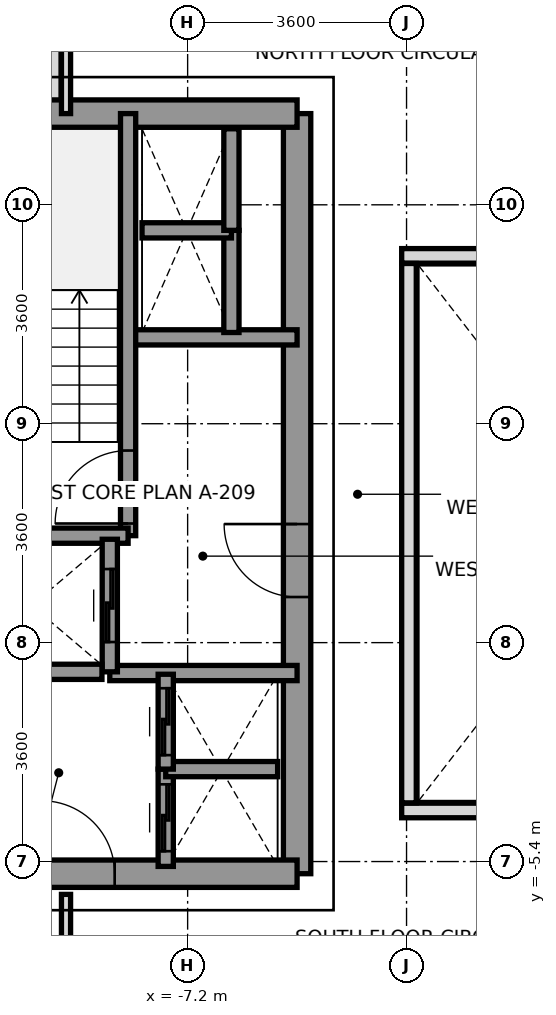
"""IFC4 building model, lengths in metres.
Left out: names, types, materials, properties, quantities, classifications, styles, units other than length and angle.
Written with IfcOpenShell. Run it as: python <this file> out.ifc"""

import sys

from ifc_helpers import new_model, si_unit, direction, frame, frame_2d, origin, place, context, subcontext, project, spatial, rectangle, extrude, source, transform, mapped, element, fill, save


model = new_model("IFC4")
c1 = context("Model", 3, precision=1e-05, world=origin(), true_north=direction((0.0, 1.0)))
c2 = subcontext(c1, "Body", "Model", "MODEL_VIEW")
j1 = project(units=[si_unit("LENGTHUNIT", "METRE"), si_unit("PLANEANGLEUNIT", "RADIAN")], contexts=[c1])
p1 = place(None, origin())
s1 = spatial("IfcSite", under=j1, at=p1, CompositionType="ELEMENT")
p2 = place(p1, origin())
s2 = spatial("IfcBuilding", under=s1, at=p2, CompositionType="ELEMENT")
p3 = place(p2, frame((0.0, 0.0, 134.6)))
s3 = spatial("IfcBuildingStorey", under=s2, at=p3, CompositionType="ELEMENT", Elevation=134.6)
p4 = place(p3, frame((-9.4, 6.953, 0.0), z_axis=(0.0, 0.0, 1.0), x_axis=(0.0, 1.0, 0.0)))
e1 = element("IfcWall", 1, at=p4, inside=s3, PredefinedType="PARAPET", context=c2, shape_type="SweptSolid", body=[
    extrude(rectangle(XDim=1.519, YDim=0.24, at=frame_2d((0.76, 0.0))), origin(), (0.0, 0.0, 1.0), 1.15),
])
p5 = place(p3, frame((-5.4, -5.6, 0.0), z_axis=(0.0, 0.0, 1.0), x_axis=(0.0, 1.0, 0.0)))
e2 = element("IfcWall", 2, at=p5, inside=s3, PredefinedType="SHEAR", context=c2, shape_type="SweptSolid", body=[
    extrude(rectangle(XDim=12.5, YDim=0.45, at=frame_2d((6.25, 0.0))), origin(), (0.0, 0.0, 1.0), 3.2),
])
p6 = place(p5, frame((4.55, 0.0, 0.0)))
e3 = element("IfcOpeningElement", 3, at=p6, cuts=e2, PredefinedType="OPENING", context=c2, shape_type="SweptSolid", body=[
    extrude(rectangle(XDim=1.2, YDim=2.2, at=frame_2d((0.6, 1.1))), frame((0.0, 0.235, 0.0), z_axis=(0.0, -1.0, 0.0), x_axis=(1.0, 0.0, 0.0)), (0.0, 0.0, 1.0), 0.47),
])
p7 = place(p3, frame((-11.381, 6.9, 0.0), z_axis=(0.0, 0.0, 1.0), x_axis=(1.0, 0.0, 0.0)))
e4 = element("IfcWall", 4, at=p7, inside=s3, PredefinedType="SHEAR", context=c2, shape_type="SweptSolid", body=[
    extrude(rectangle(XDim=5.981, YDim=0.45, at=frame_2d((2.991, 0.0))), origin(), (0.0, 0.0, 1.0), 3.2),
])
p8 = place(p3, frame((-13.2, -5.6, 0.0), z_axis=(0.0, 0.0, 1.0), x_axis=(1.0, 0.0, 0.0)))
e5 = element("IfcWall", 5, at=p8, inside=s3, PredefinedType="SHEAR", context=c2, shape_type="SweptSolid", body=[
    extrude(rectangle(XDim=7.8, YDim=0.45, at=frame_2d((3.9, 0.0))), origin(), (0.0, 0.0, 1.0), 3.2),
])
p9 = place(p8, frame((3.6, 0.0, 0.0)))
e6 = element("IfcOpeningElement", 6, at=p9, cuts=e5, PredefinedType="OPENING", context=c2, shape_type="SweptSolid", body=[
    extrude(rectangle(XDim=1.2, YDim=2.2, at=frame_2d((0.6, 1.1))), frame((0.0, 0.235, 0.0), z_axis=(0.0, -1.0, 0.0), x_axis=(1.0, 0.0, 0.0)), (0.0, 0.0, 1.0), 0.47),
])
p10 = place(p3, frame((-8.18, 3.22, 0.0), z_axis=(0.0, 0.0, 1.0), x_axis=(1.0, 0.0, 0.0)))
e7 = element("IfcWall", 7, at=p10, inside=s3, PredefinedType="SOLIDWALL", context=c2, shape_type="SweptSolid", body=[
    extrude(rectangle(XDim=2.78, YDim=0.25, at=frame_2d((1.39, 0.0))), origin(), (0.0, 0.0, 1.0), 3.2),
])
p11 = place(p3, frame((-8.48, -2.3, 0.0), z_axis=(0.0, 0.0, 1.0), x_axis=(1.0, 0.0, 0.0)))
e8 = element("IfcWall", 8, at=p11, inside=s3, PredefinedType="SOLIDWALL", context=c2, shape_type="SweptSolid", body=[
    extrude(rectangle(XDim=3.08, YDim=0.25, at=frame_2d((1.54, 0.0))), origin(), (0.0, 0.0, 1.0), 3.2),
])
p12 = place(p3, frame((-8.179, -0.041, 0.0), z_axis=(0.0, 0.0, 1.0), x_axis=(0.0, 1.0, 0.0)))
e9 = element("IfcWall", 9, at=p12, inside=s3, PredefinedType="SOLIDWALL", context=c2, shape_type="SweptSolid", body=[
    extrude(rectangle(XDim=6.941, YDim=0.25, at=frame_2d((3.47, 0.0))), origin(), (0.0, 0.0, 1.0), 3.2),
])
p13 = place(p12, frame((0.2, 0.0, 0.0)))
e10 = element("IfcOpeningElement", 10, at=p13, cuts=e9, PredefinedType="OPENING", context=c2, shape_type="SweptSolid", body=[
    extrude(rectangle(XDim=1.2, YDim=2.2, at=frame_2d((0.6, 1.1))), frame((0.0, 0.135, 0.0), z_axis=(0.0, -1.0, 0.0), x_axis=(1.0, 0.0, 0.0)), (0.0, 0.0, 1.0), 0.27),
])
p14 = place(p3, frame((-11.381, -0.041, 0.0), z_axis=(0.0, 0.0, 1.0), x_axis=(1.0, 0.0, 0.0)))
e11 = element("IfcWall", 11, at=p14, inside=s3, PredefinedType="SOLIDWALL", context=c2, shape_type="SweptSolid", body=[
    extrude(rectangle(XDim=3.202, YDim=0.25, at=frame_2d((1.601, 0.0))), origin(), (0.0, 0.0, 1.0), 3.2),
])
p15 = place(p3, frame((-8.48, -2.28, 0.0), z_axis=(0.0, 0.0, 1.0), x_axis=(0.0, 1.0, 0.0)))
e12 = element("IfcWall", 12, at=p15, inside=s3, PredefinedType="SOLIDWALL", context=c2, shape_type="SweptSolid", body=[
    extrude(rectangle(XDim=2.18, YDim=0.25, at=frame_2d((1.09, 0.0))), origin(), (0.0, 0.0, 1.0), 3.2),
])
p16 = place(p15, frame((0.49, 0.0, 0.0)))
e13 = element("IfcOpeningElement", 13, at=p16, cuts=e12, PredefinedType="OPENING", context=c2, shape_type="SweptSolid", body=[
    extrude(rectangle(XDim=1.2, YDim=2.2, at=frame_2d((0.6, 1.1))), frame((0.0, 0.135, 0.0), z_axis=(0.0, -1.0, 0.0), x_axis=(1.0, 0.0, 0.0)), (0.0, 0.0, 1.0), 0.27),
])
p17 = place(p3, frame((-10.921, -2.28, 0.0), z_axis=(0.0, 0.0, 1.0), x_axis=(1.0, 0.0, 0.0)))
e14 = element("IfcWall", 14, at=p17, inside=s3, PredefinedType="SOLIDWALL", context=c2, shape_type="SweptSolid", body=[
    extrude(rectangle(XDim=2.312, YDim=0.25, at=frame_2d((1.156, 0.0))), origin(), (0.0, 0.0, 1.0), 3.2),
])
p18 = place(p3, frame((-7.56, -5.48, 0.0), z_axis=(0.0, 0.0, 1.0), x_axis=(0.0, 1.0, 0.0)))
e15 = element("IfcWall", 15, at=p18, inside=s3, PredefinedType="SOLIDWALL", context=c2, shape_type="SweptSolid", body=[
    extrude(rectangle(XDim=1.6, YDim=0.25, at=frame_2d((0.8, 0.0))), origin(), (0.0, 0.0, 1.0), 3.2),
])
p19 = place(p18, frame((0.25, 0.0, 0.0)))
e16 = element("IfcOpeningElement", 16, at=p19, cuts=e15, PredefinedType="OPENING", context=c2, shape_type="SweptSolid", body=[
    extrude(rectangle(XDim=1.1, YDim=2.2, at=frame_2d((0.55, 1.1))), frame((0.0, 0.135, 0.0), z_axis=(0.0, -1.0, 0.0), x_axis=(1.0, 0.0, 0.0)), (0.0, 0.0, 1.0), 0.27),
])
p20 = place(p3, frame((-7.56, -3.88, 0.0), z_axis=(0.0, 0.0, 1.0), x_axis=(1.0, 0.0, 0.0)))
e17 = element("IfcWall", 17, at=p20, inside=s3, PredefinedType="SOLIDWALL", context=c2, shape_type="SweptSolid", body=[
    extrude(rectangle(XDim=1.84, YDim=0.25, at=frame_2d((0.92, 0.0))), origin(), (0.0, 0.0, 1.0), 3.2),
])
p21 = place(p3, frame((-7.56, -3.88, 0.0), z_axis=(0.0, 0.0, 1.0), x_axis=(0.0, 1.0, 0.0)))
e18 = element("IfcWall", 18, at=p21, inside=s3, PredefinedType="SOLIDWALL", context=c2, shape_type="SweptSolid", body=[
    extrude(rectangle(XDim=1.56, YDim=0.25, at=frame_2d((0.78, 0.0))), origin(), (0.0, 0.0, 1.0), 3.2),
])
p22 = place(p21, frame((0.23, 0.0, 0.0)))
e19 = element("IfcOpeningElement", 19, at=p22, cuts=e18, PredefinedType="OPENING", context=c2, shape_type="SweptSolid", body=[
    extrude(rectangle(XDim=1.1, YDim=2.2, at=frame_2d((0.55, 1.1))), frame((0.0, 0.135, 0.0), z_axis=(0.0, -1.0, 0.0), x_axis=(1.0, 0.0, 0.0)), (0.0, 0.0, 1.0), 0.27),
])
p23 = place(p3, frame((-6.48, 3.3, 0.0), z_axis=(0.0, 0.0, 1.0), x_axis=(0.0, 1.0, 0.0)))
e20 = element("IfcWall", 20, at=p23, inside=s3, PredefinedType="SOLIDWALL", context=c2, shape_type="SweptSolid", body=[
    extrude(rectangle(XDim=1.68, YDim=0.25, at=frame_2d((0.84, 0.0))), origin(), (0.0, 0.0, 1.0), 3.2),
])
p24 = place(p3, frame((-7.95, 4.98, 0.0), z_axis=(0.0, 0.0, 1.0), x_axis=(1.0, 0.0, 0.0)))
e21 = element("IfcWall", 21, at=p24, inside=s3, PredefinedType="SOLIDWALL", context=c2, shape_type="SweptSolid", body=[
    extrude(rectangle(XDim=1.47, YDim=0.25, at=frame_2d((0.735, 0.0))), origin(), (0.0, 0.0, 1.0), 3.2),
])
p25 = place(p3, frame((-6.48, 4.98, 0.0), z_axis=(0.0, 0.0, 1.0), x_axis=(0.0, 1.0, 0.0)))
e22 = element("IfcWall", 22, at=p25, inside=s3, PredefinedType="SOLIDWALL", context=c2, shape_type="SweptSolid", body=[
    extrude(rectangle(XDim=1.67, YDim=0.25, at=frame_2d((0.835, 0.0))), origin(), (0.0, 0.0, 1.0), 3.2),
])
p26 = place(p3, frame((-9.2, 6.9, 0.0), z_axis=(0.0, 0.0, 1.0), x_axis=(0.0, 1.0, 0.0)))
e23 = element("IfcWall", 23, at=p26, inside=s3, PredefinedType="PARTITIONING", context=c2, shape_type="SweptSolid", body=[
    extrude(rectangle(XDim=8.78, YDim=0.15, at=frame_2d((4.39, 0.0))), origin(), (0.0, 0.0, 1.0), 2.7),
])
p27 = place(p3, frame((-9.2, -15.68, 0.0), z_axis=(0.0, 0.0, 1.0), x_axis=(0.0, 1.0, 0.0)))
e24 = element("IfcWall", 24, at=p27, inside=s3, PredefinedType="PARTITIONING", context=c2, shape_type="SweptSolid", body=[
    extrude(rectangle(XDim=9.74, YDim=0.15, at=frame_2d((4.87, 0.0))), origin(), (0.0, 0.0, 1.0), 2.7),
])
for number, where, z_axis, x_axis in (
    (25, (-3.68, -4.56, 0.0), (0.0, 0.0, 1.0), (1.0, 0.0, 0.0)),
    (26, (-3.68, 4.56, 0.0), (0.0, 0.0, 1.0), (1.0, 0.0, 0.0)),
):
    element("IfcWall", number, at=place(p3, frame(where, z_axis=z_axis, x_axis=x_axis)), inside=s3, PredefinedType="PARAPET", context=c2, shape_type="SweptSolid", body=[
        extrude(rectangle(XDim=7.36, YDim=0.24, at=frame_2d((3.68, 0.0))), origin(), (0.0, 0.0, 1.0), 1.15),
    ])
p28 = place(p3, frame((-3.56, -4.435, 0.0), z_axis=(0.0, 0.0, 1.0), x_axis=(0.0, 1.0, 0.0)))
e27 = element("IfcWall", 27, at=p28, inside=s3, PredefinedType="PARAPET", context=c2, shape_type="SweptSolid", body=[
    extrude(rectangle(XDim=8.87, YDim=0.24, at=frame_2d((4.435, 0.0))), origin(), (0.0, 0.0, 1.0), 1.15),
])
m1 = source(origin(), c2, "Body", "SweptSolid", [
    extrude(rectangle(XDim=1.2, YDim=2.2, at=frame_2d((0.6, 1.1))), frame((0.0, 0.025, 0.0), z_axis=(0.0, -1.0, 0.0), x_axis=(1.0, 0.0, 0.0)), (0.0, 0.0, 1.0), 0.05),
])
p29 = place(p13, origin())
e28 = element("IfcDoor", 28, at=p29, inside=s3, OperationType="SINGLE_SWING_LEFT", PredefinedType="DOOR", context=c2, shape_type="MappedRepresentation", body=[
    mapped(m1, transform((0.0, 0.0, 0.0), x_axis=(1.0, 0.0, 0.0), y_axis=(0.0, 1.0, 0.0), z_axis=(0.0, 0.0, 1.0), scale=1.0)),
])
fill(e10, e28)
p30 = place(p6, origin())
e29 = element("IfcDoor", 29, at=p30, inside=s3, OperationType="SINGLE_SWING_RIGHT", PredefinedType="DOOR", context=c2, shape_type="MappedRepresentation", body=[
    mapped(m1, transform((0.0, 0.0, 0.0), x_axis=(1.0, 0.0, 0.0), y_axis=(0.0, 1.0, 0.0), z_axis=(0.0, 0.0, 1.0), scale=1.0)),
])
fill(e3, e29)
p31 = place(p9, origin())
e30 = element("IfcDoor", 30, at=p31, inside=s3, OperationType="SINGLE_SWING_LEFT", PredefinedType="DOOR", context=c2, shape_type="MappedRepresentation", body=[
    mapped(m1, transform((0.0, 0.0, 0.0), x_axis=(1.0, 0.0, 0.0), y_axis=(0.0, 1.0, 0.0), z_axis=(0.0, 0.0, 1.0), scale=1.0)),
])
fill(e6, e30)
p32 = place(p16, origin())
e31 = element("IfcDoor", 31, at=p32, inside=s3, OperationType="SLIDING_TO_RIGHT", PredefinedType="DOOR", context=c2, shape_type="MappedRepresentation", body=[
    mapped(m1, transform((0.0, 0.0, 0.0), x_axis=(1.0, 0.0, 0.0), y_axis=(0.0, 1.0, 0.0), z_axis=(0.0, 0.0, 1.0), scale=1.0)),
])
fill(e13, e31)
m2 = source(origin(), c2, "Body", "SweptSolid", [
    extrude(rectangle(XDim=1.1, YDim=2.2, at=frame_2d((0.55, 1.1))), frame((0.0, 0.025, 0.0), z_axis=(0.0, -1.0, 0.0), x_axis=(1.0, 0.0, 0.0)), (0.0, 0.0, 1.0), 0.05),
])
p33 = place(p19, origin())
e32 = element("IfcDoor", 32, at=p33, inside=s3, OperationType="SLIDING_TO_LEFT", PredefinedType="DOOR", context=c2, shape_type="MappedRepresentation", body=[
    mapped(m2, transform((0.0, 0.0, 0.0), x_axis=(1.0, 0.0, 0.0), y_axis=(0.0, 1.0, 0.0), z_axis=(0.0, 0.0, 1.0), scale=1.0)),
])
fill(e16, e32)
p34 = place(p22, origin())
e33 = element("IfcDoor", 33, at=p34, inside=s3, OperationType="SLIDING_TO_LEFT", PredefinedType="DOOR", context=c2, shape_type="MappedRepresentation", body=[
    mapped(m2, transform((0.0, 0.0, 0.0), x_axis=(1.0, 0.0, 0.0), y_axis=(0.0, 1.0, 0.0), z_axis=(0.0, 0.0, 1.0), scale=1.0)),
])
fill(e19, e33)
save(model, sys.argv[1])
